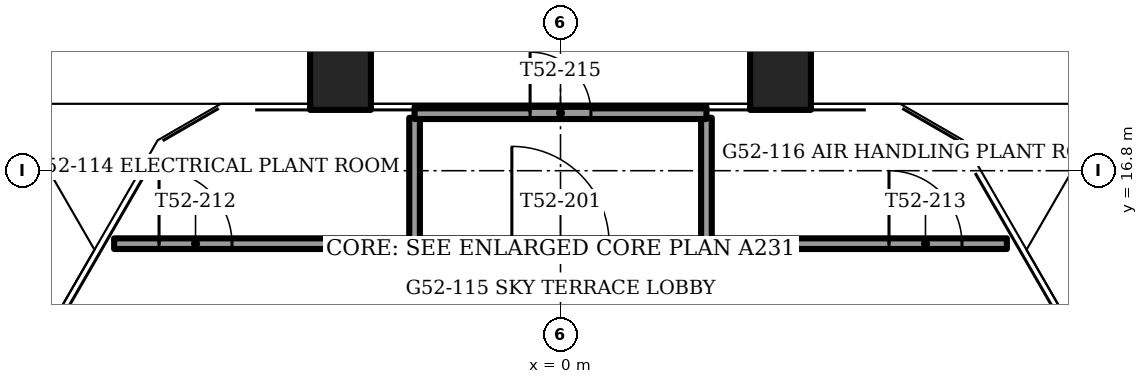
"""IFC4 building model, lengths in metres.
Left out: names, types, materials, properties, quantities, classifications, styles, units other than length and angle.
Written with IfcOpenShell. Run it as: python <this file> out.ifc"""

import sys

from ifc_helpers import new_model, si_unit, direction, frame, frame_2d, origin, origin_2d, place, context, subcontext, project, spatial, rectangle, extrude, element, fill, save


model = new_model("IFC4")
c1 = context("Model", 3, precision=1e-05, world=origin(), true_north=direction((0.0, 1.0)))
c2 = subcontext(c1, "Body", "Model", "MODEL_VIEW")
j1 = project(units=[si_unit("LENGTHUNIT", "METRE"), si_unit("PLANEANGLEUNIT", "RADIAN")], contexts=[c1])
p1 = place(None, origin())
s1 = spatial("IfcSite", under=j1, at=p1, CompositionType="ELEMENT")
p2 = place(p1, origin())
s2 = spatial("IfcBuilding", under=s1, at=p2, CompositionType="ELEMENT")
p3 = place(p2, frame((0.0, 0.0, 209.5)))
s3 = spatial("IfcBuildingStorey", under=s2, at=p3, CompositionType="ELEMENT", Elevation=209.5)
for number, where, z_axis, x_axis in (
    (1, (3.618, 18.3, -1.2), (0.0, 0.0, 1.0), (1.0, 0.0, 0.0)),
    (2, (-3.618, 18.3, -1.2), (0.0, 0.0, 1.0), (1.0, 0.0, 0.0)),
):
    element("IfcColumn", number, at=place(p3, frame(where, z_axis=z_axis, x_axis=x_axis)), inside=s3, PredefinedType="COLUMN", context=c2, shape_type="SweptSolid", body=[
        extrude(rectangle(XDim=1.0, YDim=1.0, at=origin_2d()), origin(), (0.0, 0.0, 1.0), 5.0),
    ])
p4 = place(p3, frame((-7.341, 15.6, 0.0), z_axis=(0.0, 0.0, 1.0), x_axis=(1.0, 0.0, 0.0)))
e3 = element("IfcWall", 3, at=p4, inside=s3, PredefinedType="PARTITIONING", context=c2, shape_type="SweptSolid", body=[
    extrude(rectangle(XDim=14.681, YDim=0.175, at=frame_2d((7.341, 0.0))), origin(), (0.0, 0.0, 1.0), 4.7),
])
p5 = place(p4, frame((6.541, 0.0, 0.0)))
e4 = element("IfcOpeningElement", 4, at=p5, cuts=e3, PredefinedType="OPENING", context=c2, shape_type="SweptSolid", body=[
    extrude(rectangle(XDim=1.6, YDim=2.1, at=frame_2d((0.8, 1.05))), frame((0.0, 0.087, 0.0), z_axis=(0.0, -1.0, 0.0), x_axis=(1.0, 0.0, 0.0)), (0.0, 0.0, 1.0), 0.175),
])
p6 = place(p4, frame((0.739, 0.0, 0.0)))
e5 = element("IfcOpeningElement", 5, at=p6, cuts=e3, PredefinedType="OPENING", context=c2, shape_type="SweptSolid", body=[
    extrude(rectangle(XDim=1.2, YDim=2.1, at=frame_2d((0.6, 1.05))), frame((0.0, 0.087, 0.0), z_axis=(0.0, -1.0, 0.0), x_axis=(1.0, 0.0, 0.0)), (0.0, 0.0, 1.0), 0.175),
])
p7 = place(p4, frame((12.743, 0.0, 0.0)))
e6 = element("IfcOpeningElement", 6, at=p7, cuts=e3, PredefinedType="OPENING", context=c2, shape_type="SweptSolid", body=[
    extrude(rectangle(XDim=1.2, YDim=2.1, at=frame_2d((0.6, 1.05))), frame((0.0, 0.087, 0.0), z_axis=(0.0, -1.0, 0.0), x_axis=(1.0, 0.0, 0.0)), (0.0, 0.0, 1.0), 0.175),
])
for number, where, z_axis, x_axis in (
    (7, (-2.4, 15.6, 0.0), (0.0, 0.0, 1.0), (0.0, 1.0, 0.0)),
    (8, (2.4, 15.6, 0.0), (0.0, 0.0, 1.0), (0.0, 1.0, 0.0)),
):
    element("IfcWall", number, at=place(p3, frame(where, z_axis=z_axis, x_axis=x_axis)), inside=s3, PredefinedType="PARTITIONING", context=c2, shape_type="SweptSolid", body=[
        extrude(rectangle(XDim=2.07, YDim=0.175, at=frame_2d((1.035, 0.0))), origin(), (0.0, 0.0, 1.0), 3.8),
    ])
p8 = place(p3, frame((-2.4, 17.75, 0.0), z_axis=(0.0, 0.0, 1.0), x_axis=(1.0, 0.0, 0.0)))
e9 = element("IfcWall", 9, at=p8, inside=s3, PredefinedType="PARTITIONING", context=c2, shape_type="SweptSolid", body=[
    extrude(rectangle(XDim=4.8, YDim=0.2, at=frame_2d((2.4, 0.0))), origin(), (0.0, 0.0, 1.0), 4.7),
])
p9 = place(p8, frame((1.9, 0.0, 0.0)))
e10 = element("IfcOpeningElement", 10, at=p9, cuts=e9, PredefinedType="OPENING", context=c2, shape_type="SweptSolid", body=[
    extrude(rectangle(XDim=1.0, YDim=2.1, at=frame_2d((0.5, 1.05))), frame((0.0, 0.1, 0.0), z_axis=(0.0, -1.0, 0.0), x_axis=(1.0, 0.0, 0.0)), (0.0, 0.0, 1.0), 0.2),
])
p10 = place(p5, origin())
e11 = element("IfcDoor", 11, at=p10, inside=s3, OperationType="DOUBLE_DOOR_SINGLE_SWING", PredefinedType="DOOR", context=c2, shape_type="SweptSolid", body=[
    extrude(rectangle(XDim=1.6, YDim=2.1, at=frame_2d((0.8, 1.05))), frame((0.0, 0.025, 0.0), z_axis=(0.0, -1.0, 0.0), x_axis=(1.0, 0.0, 0.0)), (0.0, 0.0, 1.0), 0.05),
])
fill(e4, e11)
p11 = place(p6, origin())
e12 = element("IfcDoor", 12, at=p11, inside=s3, OperationType="SINGLE_SWING_RIGHT", PredefinedType="DOOR", context=c2, shape_type="SweptSolid", body=[
    extrude(rectangle(XDim=1.2, YDim=2.1, at=frame_2d((0.6, 1.05))), frame((0.0, 0.025, 0.0), z_axis=(0.0, -1.0, 0.0), x_axis=(1.0, 0.0, 0.0)), (0.0, 0.0, 1.0), 0.05),
])
fill(e5, e12)
p12 = place(p7, origin())
e13 = element("IfcDoor", 13, at=p12, inside=s3, OperationType="SINGLE_SWING_LEFT", PredefinedType="DOOR", context=c2, shape_type="SweptSolid", body=[
    extrude(rectangle(XDim=1.2, YDim=2.1, at=frame_2d((0.6, 1.05))), frame((0.0, 0.025, 0.0), z_axis=(0.0, -1.0, 0.0), x_axis=(1.0, 0.0, 0.0)), (0.0, 0.0, 1.0), 0.05),
])
fill(e6, e13)
p13 = place(p9, origin())
e14 = element("IfcDoor", 14, at=p13, inside=s3, OperationType="SINGLE_SWING_LEFT", PredefinedType="DOOR", context=c2, shape_type="SweptSolid", body=[
    extrude(rectangle(XDim=1.0, YDim=2.1, at=frame_2d((0.5, 1.05))), frame((0.0, 0.025, 0.0), z_axis=(0.0, -1.0, 0.0), x_axis=(1.0, 0.0, 0.0)), (0.0, 0.0, 1.0), 0.05),
])
fill(e10, e14)
save(model, sys.argv[1])
